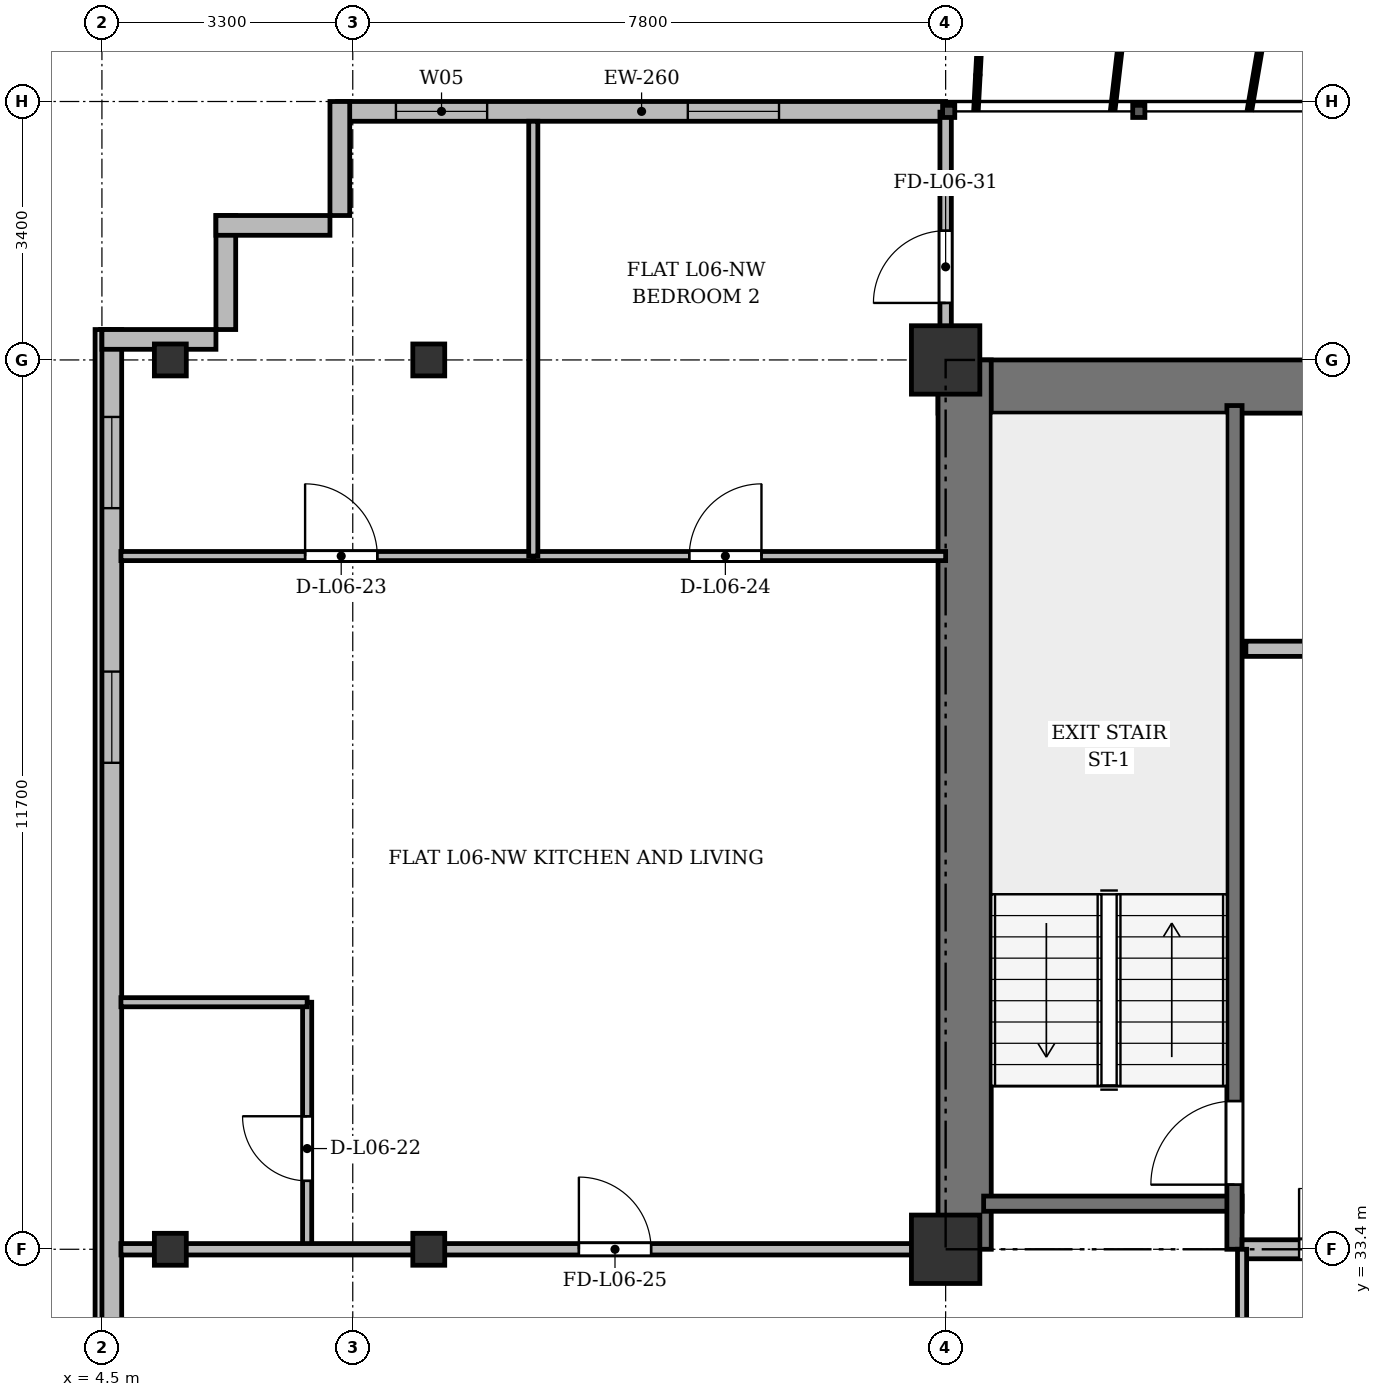
"""IFC4 building model, lengths in metres.
Left out: names, types, materials, properties, quantities, classifications, styles, units other than length and angle.
Written with IfcOpenShell. Run it as: python <this file> out.ifc"""

import sys

from ifc_helpers import new_model, si_unit, direction, frame, frame_2d, origin, origin_2d, place, context, subcontext, project, spatial, rectangle, i_section, extrude, source, transform, mapped, element, fill, save


model = new_model("IFC4")
c1 = context("Model", 3, precision=1e-05, world=origin(), true_north=direction((0.0, 1.0)))
c2 = subcontext(c1, "Body", "Model", "MODEL_VIEW")
j1 = project(units=[si_unit("LENGTHUNIT", "METRE"), si_unit("PLANEANGLEUNIT", "RADIAN")], contexts=[c1])
p1 = place(None, origin())
s1 = spatial("IfcSite", under=j1, at=p1, CompositionType="ELEMENT")
p2 = place(p1, origin())
s2 = spatial("IfcBuilding", under=s1, at=p2, CompositionType="ELEMENT")
p3 = place(p2, frame((0.0, 0.0, 27.1)))
s3 = spatial("IfcBuildingStorey", under=s2, at=p3, CompositionType="ELEMENT", Elevation=27.1)
m1 = source(origin(), c2, "Body", "SweptSolid", [
    extrude(i_section(OverallWidth=0.42, OverallDepth=0.42, WebThickness=0.026, FlangeThickness=0.04, at=origin_2d()), origin(), (0.0, 0.0, 1.0), 3.6),
])
for number, where, z_axis, x_axis in (
    (1, (5.4, 33.4, 0.0), (0.0, 0.0, 1.0), (1.0, 0.0, 0.0)),
    (2, (5.4, 45.1, 0.0), (0.0, 0.0, 1.0), (1.0, 0.0, 0.0)),
    (3, (8.8, 33.4, 0.0), (0.0, 0.0, 1.0), (1.0, 0.0, 0.0)),
    (4, (8.8, 45.1, 0.0), (0.0, 0.0, 1.0), (1.0, 0.0, 0.0)),
):
    element("IfcColumn", number, at=place(p3, frame(where, z_axis=z_axis, x_axis=x_axis)), inside=s3, PredefinedType="COLUMN", context=c2, shape_type="MappedRepresentation", body=[
        mapped(m1, transform((0.0, 0.0, 0.0), x_axis=(1.0, 0.0, 0.0), y_axis=(0.0, 1.0, 0.0), z_axis=(0.0, 0.0, 1.0), scale=1.0)),
    ])
m2 = source(origin(), c2, "Body", "SweptSolid", [
    extrude(rectangle(XDim=0.9, YDim=0.9, at=origin_2d()), origin(), (0.0, 0.0, 1.0), 3.6),
])
for number, where, z_axis, x_axis in (
    (5, (15.6, 33.4, 0.0), (0.0, 0.0, 1.0), (1.0, 0.0, 0.0)),
    (6, (15.6, 45.1, 0.0), (0.0, 0.0, 1.0), (1.0, 0.0, 0.0)),
):
    element("IfcColumn", number, at=place(p3, frame(where, z_axis=z_axis, x_axis=x_axis)), inside=s3, PredefinedType="COLUMN", context=c2, shape_type="MappedRepresentation", body=[
        mapped(m2, transform((0.0, 0.0, 0.0), x_axis=(1.0, 0.0, 0.0), y_axis=(0.0, 1.0, 0.0), z_axis=(0.0, 0.0, 1.0), scale=1.0)),
    ])
p4 = place(p3, frame((7.6, 48.37, 0.0), z_axis=(0.0, 0.0, 1.0), x_axis=(1.0, 0.0, 0.0)))
e7 = element("IfcWall", 7, at=p4, inside=s3, PredefinedType="SOLIDWALL", context=c2, shape_type="SweptSolid", body=[
    extrude(rectangle(XDim=8.0, YDim=0.26, at=frame_2d((4.0, 0.0))), origin(), (0.0, 0.0, 1.0), 3.34),
])
p5 = place(p4, frame((0.768, 0.0, 0.9)))
e8 = element("IfcOpeningElement", 8, at=p5, cuts=e7, PredefinedType="OPENING", context=c2, shape_type="SweptSolid", body=[
    extrude(rectangle(XDim=1.2, YDim=1.65, at=frame_2d((0.6, 0.825))), frame((0.0, 0.14, 0.0), z_axis=(0.0, -1.0, 0.0), x_axis=(1.0, 0.0, 0.0)), (0.0, 0.0, 1.0), 0.28),
])
p6 = place(p4, frame((4.608, 0.0, 0.9)))
e9 = element("IfcOpeningElement", 9, at=p6, cuts=e7, PredefinedType="OPENING", context=c2, shape_type="SweptSolid", body=[
    extrude(rectangle(XDim=1.2, YDim=1.65, at=frame_2d((0.6, 0.825))), frame((0.0, 0.14, 0.0), z_axis=(0.0, -1.0, 0.0), x_axis=(1.0, 0.0, 0.0)), (0.0, 0.0, 1.0), 0.28),
])
p7 = place(p3, frame((4.63, 5.9, 0.0), z_axis=(0.0, 0.0, 1.0), x_axis=(0.0, 1.0, 0.0)))
e10 = element("IfcWall", 10, at=p7, inside=s3, PredefinedType="SOLIDWALL", context=c2, shape_type="SweptSolid", body=[
    extrude(rectangle(XDim=39.6, YDim=0.26, at=frame_2d((19.8, 0.0))), origin(), (0.0, 0.0, 1.0), 3.34),
])
p8 = place(p7, frame((1.45, 0.0, 0.92)))
e11 = element("IfcOpeningElement", 11, at=p8, cuts=e10, PredefinedType="OPENING", context=c2, shape_type="SweptSolid", body=[
    extrude(rectangle(XDim=1.2, YDim=1.65, at=frame_2d((0.6, 0.825))), frame((0.0, 0.14, 0.0), z_axis=(0.0, -1.0, 0.0), x_axis=(1.0, 0.0, 0.0)), (0.0, 0.0, 1.0), 0.28),
])
p9 = place(p7, frame((4.2, 0.0, 0.92)))
e12 = element("IfcOpeningElement", 12, at=p9, cuts=e10, PredefinedType="OPENING", context=c2, shape_type="SweptSolid", body=[
    extrude(rectangle(XDim=2.6, YDim=1.9, at=frame_2d((1.3, 0.95))), frame((0.0, 0.14, 0.0), z_axis=(0.0, -1.0, 0.0), x_axis=(1.0, 0.0, 0.0)), (0.0, 0.0, 1.0), 0.28),
])
p10 = place(p7, frame((8.4, 0.0, 0.92)))
e13 = element("IfcOpeningElement", 13, at=p10, cuts=e10, PredefinedType="OPENING", context=c2, shape_type="SweptSolid", body=[
    extrude(rectangle(XDim=2.6, YDim=1.9, at=frame_2d((1.3, 0.95))), frame((0.0, 0.14, 0.0), z_axis=(0.0, -1.0, 0.0), x_axis=(1.0, 0.0, 0.0)), (0.0, 0.0, 1.0), 0.28),
])
p11 = place(p7, frame((33.9, 0.0, 0.92)))
e14 = element("IfcOpeningElement", 14, at=p11, cuts=e10, PredefinedType="OPENING", context=c2, shape_type="SweptSolid", body=[
    extrude(rectangle(XDim=1.2, YDim=1.65, at=frame_2d((0.6, 0.825))), frame((0.0, 0.14, 0.0), z_axis=(0.0, -1.0, 0.0), x_axis=(1.0, 0.0, 0.0)), (0.0, 0.0, 1.0), 0.28),
])
p12 = place(p7, frame((37.25, 0.0, 0.92)))
e15 = element("IfcOpeningElement", 15, at=p12, cuts=e10, PredefinedType="OPENING", context=c2, shape_type="SweptSolid", body=[
    extrude(rectangle(XDim=1.2, YDim=1.65, at=frame_2d((0.6, 0.825))), frame((0.0, 0.14, 0.0), z_axis=(0.0, -1.0, 0.0), x_axis=(1.0, 0.0, 0.0)), (0.0, 0.0, 1.0), 0.28),
])
p13 = place(p3, frame((4.5, 45.37, 0.0), z_axis=(0.0, 0.0, 1.0), x_axis=(1.0, 0.0, 0.0)))
e16 = element("IfcWall", 16, at=p13, inside=s3, PredefinedType="SOLIDWALL", context=c2, shape_type="SweptSolid", body=[
    extrude(rectangle(XDim=1.5, YDim=0.26, at=frame_2d((0.75, 0.0))), origin(), (0.0, 0.0, 1.0), 2.69),
])
for number, where, z_axis, x_axis in (
    (17, (6.13, 45.5, 0.0), (0.0, 0.0, 1.0), (0.0, 1.0, 0.0)),
    (18, (6.0, 46.87, 0.0), (0.0, 0.0, 1.0), (1.0, 0.0, 0.0)),
    (19, (7.63, 47.0, 0.0), (0.0, 0.0, 1.0), (0.0, 1.0, 0.0)),
):
    element("IfcWall", number, at=place(p3, frame(where, z_axis=z_axis, x_axis=x_axis)), inside=s3, PredefinedType="SOLIDWALL", context=c2, shape_type="SweptSolid", body=[
        extrude(rectangle(XDim=1.5, YDim=0.26, at=frame_2d((0.75, 0.0))), origin(), (0.0, 0.0, 1.0), 3.34),
    ])
p14 = place(p3, frame((15.5, 44.75, 0.0), z_axis=(0.0, 0.0, 1.0), x_axis=(1.0, 0.0, 0.0)))
e20 = element("IfcWall", 20, at=p14, inside=s3, PredefinedType="SHEAR", context=c2, shape_type="SweptSolid", body=[
    extrude(rectangle(XDim=43.4, YDim=0.7, at=frame_2d((21.7, 0.0))), origin(), (0.0, 0.0, 1.0), 3.34),
])
p15 = place(p3, frame((15.85, 33.4, 0.0), z_axis=(0.0, 0.0, 1.0), x_axis=(0.0, 1.0, 0.0)))
e21 = element("IfcWall", 21, at=p15, inside=s3, PredefinedType="SHEAR", context=c2, shape_type="SweptSolid", body=[
    extrude(rectangle(XDim=11.7, YDim=0.7, at=frame_2d((5.85, 0.0))), origin(), (0.0, 0.0, 1.0), 3.34),
])
p16 = place(p3, frame((16.1, 34.0, 0.0), z_axis=(0.0, 0.0, 1.0), x_axis=(1.0, 0.0, 0.0)))
e22 = element("IfcWall", 22, at=p16, inside=s3, PredefinedType="SHEAR", context=c2, shape_type="SweptSolid", body=[
    extrude(rectangle(XDim=3.4, YDim=0.2, at=frame_2d((1.7, 0.0))), origin(), (0.0, 0.0, 1.0), 3.34),
])
p17 = place(p3, frame((19.4, 33.4, 0.0), z_axis=(0.0, 0.0, 1.0), x_axis=(0.0, 1.0, 0.0)))
e23 = element("IfcWall", 23, at=p17, inside=s3, PredefinedType="SHEAR", context=c2, shape_type="SweptSolid", body=[
    extrude(rectangle(XDim=11.1, YDim=0.2, at=frame_2d((5.55, 0.0))), origin(), (0.0, 0.0, 1.0), 3.34),
])
p18 = place(p17, frame((0.85, 0.0, 0.0)))
e24 = element("IfcOpeningElement", 24, at=p18, cuts=e23, PredefinedType="OPENING", context=c2, shape_type="SweptSolid", body=[
    extrude(rectangle(XDim=1.1, YDim=2.15, at=frame_2d((0.55, 1.075))), frame((0.0, 0.11, 0.0), z_axis=(0.0, -1.0, 0.0), x_axis=(1.0, 0.0, 0.0)), (0.0, 0.0, 1.0), 0.22),
])
p19 = place(p3, frame((19.55, 41.3, 0.0), z_axis=(0.0, 0.0, 1.0), x_axis=(1.0, 0.0, 0.0)))
e25 = element("IfcWall", 25, at=p19, inside=s3, PredefinedType="SOLIDWALL", context=c2, shape_type="SweptSolid", body=[
    extrude(rectangle(XDim=6.75, YDim=0.2, at=frame_2d((3.375, 0.0))), origin(), (0.0, 0.0, 1.0), 3.34),
])
p20 = place(p19, frame((1.7, 0.0, 0.0)))
e26 = element("IfcOpeningElement", 26, at=p20, cuts=e25, PredefinedType="OPENING", context=c2, shape_type="SweptSolid", body=[
    extrude(rectangle(XDim=1.1, YDim=2.15, at=frame_2d((0.55, 1.075))), frame((0.0, 0.11, 0.0), z_axis=(0.0, -1.0, 0.0), x_axis=(1.0, 0.0, 0.0)), (0.0, 0.0, 1.0), 0.22),
])
p21 = place(p19, frame((4.4, 0.0, 0.0)))
e27 = element("IfcOpeningElement", 27, at=p21, cuts=e25, PredefinedType="OPENING", context=c2, shape_type="SweptSolid", body=[
    extrude(rectangle(XDim=1.1, YDim=2.15, at=frame_2d((0.55, 1.075))), frame((0.0, 0.11, 0.0), z_axis=(0.0, -1.0, 0.0), x_axis=(1.0, 0.0, 0.0)), (0.0, 0.0, 1.0), 0.22),
])
p22 = place(p3, frame((19.5, 33.4, 0.0), z_axis=(0.0, 0.0, 1.0), x_axis=(1.0, 0.0, 0.0)))
e28 = element("IfcWall", 28, at=p22, inside=s3, PredefinedType="PARTITIONING", context=c2, shape_type="SweptSolid", body=[
    extrude(rectangle(XDim=6.8, YDim=0.25, at=frame_2d((3.4, 0.0))), origin(), (0.0, 0.0, 1.0), 2.69),
])
p23 = place(p22, frame((0.75, 0.0, 0.0)))
e29 = element("IfcOpeningElement", 29, at=p23, cuts=e28, PredefinedType="OPENING", context=c2, shape_type="SweptSolid", body=[
    extrude(rectangle(XDim=1.6, YDim=2.2, at=frame_2d((0.8, 1.1))), frame((0.0, 0.135, 0.0), z_axis=(0.0, -1.0, 0.0), x_axis=(1.0, 0.0, 0.0)), (0.0, 0.0, 1.0), 0.27),
])
p24 = place(p3, frame((19.5, 29.8, 0.0), z_axis=(0.0, 0.0, 1.0), x_axis=(0.0, 1.0, 0.0)))
e30 = element("IfcWall", 30, at=p24, inside=s3, PredefinedType="PARTITIONING", context=c2, shape_type="SweptSolid", body=[
    extrude(rectangle(XDim=3.6, YDim=0.12, at=frame_2d((1.8, 0.0))), origin(), (0.0, 0.0, 1.0), 2.69),
])
p25 = place(p3, frame((7.2, 33.4, 0.0), z_axis=(0.0, 0.0, 1.0), x_axis=(0.0, 1.0, 0.0)))
e31 = element("IfcWall", 31, at=p25, inside=s3, PredefinedType="PARTITIONING", context=c2, shape_type="SweptSolid", body=[
    extrude(rectangle(XDim=3.25, YDim=0.12, at=frame_2d((1.625, 0.0))), origin(), (0.0, 0.0, 1.0), 2.69),
])
p26 = place(p25, frame((0.9, 0.0, 0.0)))
e32 = element("IfcOpeningElement", 32, at=p26, cuts=e31, PredefinedType="OPENING", context=c2, shape_type="SweptSolid", body=[
    extrude(rectangle(XDim=0.85, YDim=2.1, at=frame_2d((0.425, 1.05))), frame((0.0, 0.07, 0.0), z_axis=(0.0, -1.0, 0.0), x_axis=(1.0, 0.0, 0.0)), (0.0, 0.0, 1.0), 0.14),
])
p27 = place(p3, frame((4.75, 36.65, 0.0), z_axis=(0.0, 0.0, 1.0), x_axis=(1.0, 0.0, 0.0)))
e33 = element("IfcWall", 33, at=p27, inside=s3, PredefinedType="PARTITIONING", context=c2, shape_type="SweptSolid", body=[
    extrude(rectangle(XDim=2.45, YDim=0.12, at=frame_2d((1.225, 0.0))), origin(), (0.0, 0.0, 1.0), 2.752),
])
p28 = place(p3, frame((4.75, 42.52, 0.0), z_axis=(0.0, 0.0, 1.0), x_axis=(1.0, 0.0, 0.0)))
e34 = element("IfcWall", 34, at=p28, inside=s3, PredefinedType="PARTITIONING", context=c2, shape_type="SweptSolid", body=[
    extrude(rectangle(XDim=5.425, YDim=0.12, at=frame_2d((2.712, 0.0))), origin(), (0.0, 0.0, 1.0), 2.752),
])
p29 = place(p28, frame((2.423, 0.0, 0.0)))
e35 = element("IfcOpeningElement", 35, at=p29, cuts=e34, PredefinedType="OPENING", context=c2, shape_type="SweptSolid", body=[
    extrude(rectangle(XDim=0.95, YDim=2.15, at=frame_2d((0.475, 1.075))), frame((0.0, 0.07, 0.0), z_axis=(0.0, -1.0, 0.0), x_axis=(1.0, 0.0, 0.0)), (0.0, 0.0, 1.0), 0.14),
])
p30 = place(p3, frame((10.175, 42.52, 0.0), z_axis=(0.0, 0.0, 1.0), x_axis=(1.0, 0.0, 0.0)))
e36 = element("IfcWall", 36, at=p30, inside=s3, PredefinedType="PARTITIONING", context=c2, shape_type="SweptSolid", body=[
    extrude(rectangle(XDim=5.425, YDim=0.12, at=frame_2d((2.712, 0.0))), origin(), (0.0, 0.0, 1.0), 2.752),
])
p31 = place(p30, frame((2.052, 0.0, 0.0)))
e37 = element("IfcOpeningElement", 37, at=p31, cuts=e36, PredefinedType="OPENING", context=c2, shape_type="SweptSolid", body=[
    extrude(rectangle(XDim=0.95, YDim=2.15, at=frame_2d((0.475, 1.075))), frame((0.0, 0.07, 0.0), z_axis=(0.0, -1.0, 0.0), x_axis=(1.0, 0.0, 0.0)), (0.0, 0.0, 1.0), 0.14),
])
p32 = place(p3, frame((10.175, 42.52, 0.0), z_axis=(0.0, 0.0, 1.0), x_axis=(0.0, 1.0, 0.0)))
e38 = element("IfcWall", 38, at=p32, inside=s3, PredefinedType="PARTITIONING", context=c2, shape_type="SweptSolid", body=[
    extrude(rectangle(XDim=5.72, YDim=0.12, at=frame_2d((2.86, 0.0))), origin(), (0.0, 0.0, 1.0), 2.69),
])
p33 = place(p3, frame((4.75, 33.4, 0.0), z_axis=(0.0, 0.0, 1.0), x_axis=(1.0, 0.0, 0.0)))
e39 = element("IfcWall", 39, at=p33, inside=s3, PredefinedType="PARTITIONING", context=c2, shape_type="SweptSolid", body=[
    extrude(rectangle(XDim=10.85, YDim=0.15, at=frame_2d((5.425, 0.0))), origin(), (0.0, 0.0, 1.0), 2.69),
])
p34 = place(p33, frame((6.025, 0.0, 0.0)))
e40 = element("IfcOpeningElement", 40, at=p34, cuts=e39, PredefinedType="OPENING", context=c2, shape_type="SweptSolid", body=[
    extrude(rectangle(XDim=0.95, YDim=2.15, at=frame_2d((0.475, 1.075))), frame((0.0, 0.085, 0.0), z_axis=(0.0, -1.0, 0.0), x_axis=(1.0, 0.0, 0.0)), (0.0, 0.0, 1.0), 0.17),
])
p35 = place(p3, frame((15.6, 44.75, 0.0), z_axis=(0.0, 0.0, 1.0), x_axis=(0.0, 1.0, 0.0)))
e41 = element("IfcWall", 41, at=p35, inside=s3, PredefinedType="PARTITIONING", context=c2, shape_type="SweptSolid", body=[
    extrude(rectangle(XDim=3.61, YDim=0.15, at=frame_2d((1.805, 0.0))), origin(), (0.0, 0.0, 1.0), 2.752),
])
p36 = place(p35, frame((1.1, 0.0, 0.0)))
e42 = element("IfcOpeningElement", 42, at=p36, cuts=e41, PredefinedType="OPENING", context=c2, shape_type="SweptSolid", body=[
    extrude(rectangle(XDim=0.95, YDim=2.15, at=frame_2d((0.475, 1.075))), frame((0.0, 0.085, 0.0), z_axis=(0.0, -1.0, 0.0), x_axis=(1.0, 0.0, 0.0)), (0.0, 0.0, 1.0), 0.17),
])
m3 = source(origin(), c2, "Body", "SweptSolid", [
    extrude(rectangle(XDim=1.2, YDim=1.65, at=frame_2d((0.6, 0.825))), frame((0.0, 0.03, 0.0), z_axis=(0.0, -1.0, 0.0), x_axis=(1.0, 0.0, 0.0)), (0.0, 0.0, 1.0), 0.06),
])
p37 = place(p5, origin())
e43 = element("IfcWindow", 43, at=p37, inside=s3, PartitioningType="SINGLE_PANEL", PredefinedType="WINDOW", context=c2, shape_type="MappedRepresentation", body=[
    mapped(m3, transform((0.0, 0.0, 0.0), x_axis=(1.0, 0.0, 0.0), y_axis=(0.0, 1.0, 0.0), z_axis=(0.0, 0.0, 1.0), scale=1.0)),
])
fill(e8, e43)
p38 = place(p6, origin())
e44 = element("IfcWindow", 44, at=p38, inside=s3, PartitioningType="SINGLE_PANEL", PredefinedType="WINDOW", context=c2, shape_type="MappedRepresentation", body=[
    mapped(m3, transform((0.0, 0.0, 0.0), x_axis=(1.0, 0.0, 0.0), y_axis=(0.0, 1.0, 0.0), z_axis=(0.0, 0.0, 1.0), scale=1.0)),
])
fill(e9, e44)
p39 = place(p11, origin())
e45 = element("IfcWindow", 45, at=p39, inside=s3, PartitioningType="SINGLE_PANEL", PredefinedType="WINDOW", context=c2, shape_type="MappedRepresentation", body=[
    mapped(m3, transform((0.0, 0.0, 0.0), x_axis=(1.0, 0.0, 0.0), y_axis=(0.0, 1.0, 0.0), z_axis=(0.0, 0.0, 1.0), scale=1.0)),
])
fill(e14, e45)
p40 = place(p12, origin())
e46 = element("IfcWindow", 46, at=p40, inside=s3, PartitioningType="SINGLE_PANEL", PredefinedType="WINDOW", context=c2, shape_type="MappedRepresentation", body=[
    mapped(m3, transform((0.0, 0.0, 0.0), x_axis=(1.0, 0.0, 0.0), y_axis=(0.0, 1.0, 0.0), z_axis=(0.0, 0.0, 1.0), scale=1.0)),
])
fill(e15, e46)
m4 = source(origin(), c2, "Body", "SweptSolid", [
    extrude(rectangle(XDim=1.1, YDim=2.15, at=frame_2d((0.55, 1.075))), frame((0.0, 0.025, 0.0), z_axis=(0.0, -1.0, 0.0), x_axis=(1.0, 0.0, 0.0)), (0.0, 0.0, 1.0), 0.05),
])
p41 = place(p18, origin())
e47 = element("IfcDoor", 47, at=p41, inside=s3, OperationType="SINGLE_SWING_LEFT", PredefinedType="DOOR", context=c2, shape_type="MappedRepresentation", body=[
    mapped(m4, transform((0.0, 0.0, 0.0), x_axis=(1.0, 0.0, 0.0), y_axis=(0.0, 1.0, 0.0), z_axis=(0.0, 0.0, 1.0), scale=1.0)),
])
fill(e24, e47)
m5 = source(origin(), c2, "Body", "SweptSolid", [
    extrude(rectangle(XDim=1.6, YDim=2.2, at=frame_2d((0.8, 1.1))), frame((0.0, 0.025, 0.0), z_axis=(0.0, -1.0, 0.0), x_axis=(1.0, 0.0, 0.0)), (0.0, 0.0, 1.0), 0.05),
])
p42 = place(p23, origin())
e48 = element("IfcDoor", 48, at=p42, inside=s3, OperationType="DOUBLE_DOOR_SINGLE_SWING", PredefinedType="DOOR", context=c2, shape_type="MappedRepresentation", body=[
    mapped(m5, transform((0.0, 0.0, 0.0), x_axis=(1.0, 0.0, 0.0), y_axis=(0.0, 1.0, 0.0), z_axis=(0.0, 0.0, 1.0), scale=1.0)),
])
fill(e29, e48)
m6 = source(origin(), c2, "Body", "SweptSolid", [
    extrude(rectangle(XDim=0.85, YDim=2.1, at=frame_2d((0.425, 1.05))), frame((0.0, 0.025, 0.0), z_axis=(0.0, -1.0, 0.0), x_axis=(1.0, 0.0, 0.0)), (0.0, 0.0, 1.0), 0.05),
])
p43 = place(p26, origin())
e49 = element("IfcDoor", 49, at=p43, inside=s3, OperationType="SINGLE_SWING_RIGHT", PredefinedType="DOOR", context=c2, shape_type="MappedRepresentation", body=[
    mapped(m6, transform((0.0, 0.0, 0.0), x_axis=(1.0, 0.0, 0.0), y_axis=(0.0, 1.0, 0.0), z_axis=(0.0, 0.0, 1.0), scale=1.0)),
])
fill(e32, e49)
m7 = source(origin(), c2, "Body", "SweptSolid", [
    extrude(rectangle(XDim=0.95, YDim=2.15, at=frame_2d((0.475, 1.075))), frame((0.0, 0.025, 0.0), z_axis=(0.0, -1.0, 0.0), x_axis=(1.0, 0.0, 0.0)), (0.0, 0.0, 1.0), 0.05),
])
p44 = place(p29, origin())
e50 = element("IfcDoor", 50, at=p44, inside=s3, OperationType="SINGLE_SWING_LEFT", PredefinedType="DOOR", context=c2, shape_type="MappedRepresentation", body=[
    mapped(m7, transform((0.0, 0.0, 0.0), x_axis=(1.0, 0.0, 0.0), y_axis=(0.0, 1.0, 0.0), z_axis=(0.0, 0.0, 1.0), scale=1.0)),
])
fill(e35, e50)
p45 = place(p31, origin())
e51 = element("IfcDoor", 51, at=p45, inside=s3, OperationType="SINGLE_SWING_RIGHT", PredefinedType="DOOR", context=c2, shape_type="MappedRepresentation", body=[
    mapped(m7, transform((0.0, 0.0, 0.0), x_axis=(1.0, 0.0, 0.0), y_axis=(0.0, 1.0, 0.0), z_axis=(0.0, 0.0, 1.0), scale=1.0)),
])
fill(e37, e51)
p46 = place(p34, origin())
e52 = element("IfcDoor", 52, at=p46, inside=s3, OperationType="SINGLE_SWING_LEFT", PredefinedType="DOOR", context=c2, shape_type="MappedRepresentation", body=[
    mapped(m7, transform((0.0, 0.0, 0.0), x_axis=(1.0, 0.0, 0.0), y_axis=(0.0, 1.0, 0.0), z_axis=(0.0, 0.0, 1.0), scale=1.0)),
])
fill(e40, e52)
p47 = place(p36, origin())
e53 = element("IfcDoor", 53, at=p47, inside=s3, OperationType="SINGLE_SWING_LEFT", PredefinedType="DOOR", context=c2, shape_type="MappedRepresentation", body=[
    mapped(m7, transform((0.0, 0.0, 0.0), x_axis=(1.0, 0.0, 0.0), y_axis=(0.0, 1.0, 0.0), z_axis=(0.0, 0.0, 1.0), scale=1.0)),
])
fill(e42, e53)
save(model, sys.argv[1])
